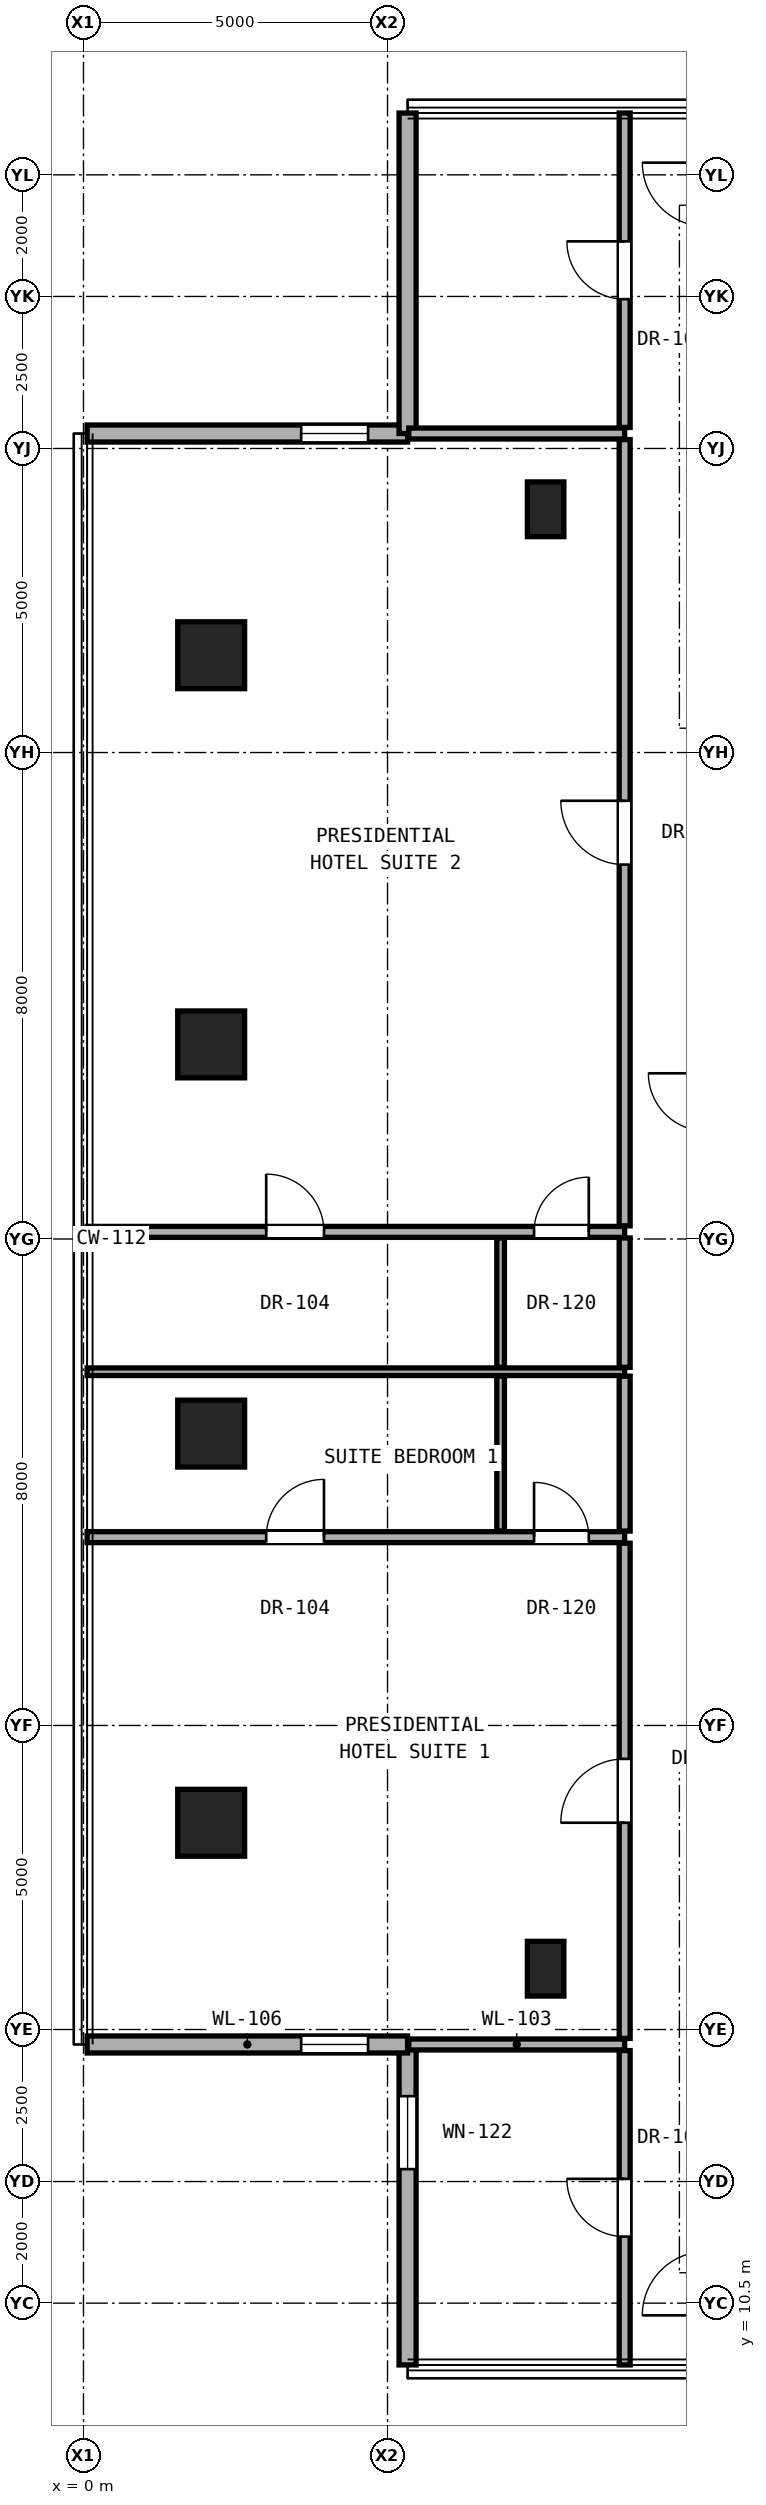
"""IFC4 building model, lengths in metres.
Left out: names, types, materials, properties, quantities, classifications, styles, units other than length and angle.
Written with IfcOpenShell. Run it as: python <this file> out.ifc"""

import sys

from ifc_helpers import new_model, si_unit, direction, frame, frame_2d, origin, origin_2d, place, context, subcontext, project, spatial, rectangle, hollow_rectangle, extrude, element, fill, save


model = new_model("IFC4")
c1 = context("Model", 3, precision=1e-05, world=origin(), true_north=direction((0.0, 1.0)))
c2 = subcontext(c1, "Body", "Model", "MODEL_VIEW")
j1 = project(units=[si_unit("LENGTHUNIT", "METRE"), si_unit("PLANEANGLEUNIT", "RADIAN")], contexts=[c1])
p1 = place(None, origin())
s1 = spatial("IfcSite", under=j1, at=p1, CompositionType="ELEMENT")
p2 = place(p1, origin())
s2 = spatial("IfcBuilding", under=s1, at=p2, CompositionType="ELEMENT")
p3 = place(p2, frame((0.0, 0.0, 124.7)))
s3 = spatial("IfcBuildingStorey", under=s2, at=p3, CompositionType="ELEMENT", Elevation=124.7)
for number, where, z_axis, x_axis in (
    (1, (2.1, 18.4, 0.0), (0.0, 0.0, 1.0), (1.0, 0.0, 0.0)),
    (2, (2.1, 24.8, 0.0), (0.0, 0.0, 1.0), (1.0, 0.0, 0.0)),
    (3, (2.1, 31.2, 0.0), (0.0, 0.0, 1.0), (1.0, 0.0, 0.0)),
    (4, (2.1, 37.6, 0.0), (0.0, 0.0, 1.0), (1.0, 0.0, 0.0)),
):
    element("IfcColumn", number, at=place(p3, frame(where, z_axis=z_axis, x_axis=x_axis)), inside=s3, PredefinedType="COLUMN", context=c2, shape_type="SweptSolid", body=[
        extrude(hollow_rectangle(XDim=1.1, YDim=1.1, WallThickness=0.06, at=origin_2d()), origin(), (0.0, 0.0, 1.0), 3.3),
    ])
for number, where, z_axis, x_axis in (
    (5, (7.6, 16.0, 0.0), (0.0, 0.0, 1.0), (1.0, 0.0, 0.0)),
    (6, (7.6, 40.0, 0.0), (0.0, 0.0, 1.0), (1.0, 0.0, 0.0)),
):
    element("IfcColumn", number, at=place(p3, frame(where, z_axis=z_axis, x_axis=x_axis)), inside=s3, PredefinedType="PILASTER", context=c2, shape_type="SweptSolid", body=[
        extrude(rectangle(XDim=0.6, YDim=0.9, at=origin_2d()), origin(), (0.0, 0.0, 1.0), 3.3),
    ])
p4 = place(p3, frame((5.33, 14.754, 0.0), z_axis=(0.0, 0.0, 1.0), x_axis=(0.0, -1.0, 0.0)))
e7 = element("IfcWall", 7, at=p4, inside=s3, PredefinedType="SOLIDWALL", context=c2, shape_type="SweptSolid", body=[
    extrude(rectangle(XDim=5.27, YDim=0.28, at=frame_2d((2.635, 0.0))), origin(), (0.0, 0.0, 1.0), 3.06),
])
p5 = place(p4, frame((0.85, 0.0, 0.81)))
e8 = element("IfcOpeningElement", 8, at=p5, cuts=e7, PredefinedType="OPENING", context=c2, shape_type="SweptSolid", body=[
    extrude(rectangle(XDim=1.2, YDim=2.1, at=frame_2d((0.6, 1.05))), frame((0.0, 0.15, 0.0), z_axis=(0.0, -1.0, 0.0), x_axis=(1.0, 0.0, 0.0)), (0.0, 0.0, 1.0), 0.3),
])
p6 = place(p3, frame((0.06, 14.754, 0.0), z_axis=(0.0, 0.0, 1.0), x_axis=(1.0, 0.0, 0.0)))
e9 = element("IfcWall", 9, at=p6, inside=s3, PredefinedType="SOLIDWALL", context=c2, shape_type="SweptSolid", body=[
    extrude(rectangle(XDim=5.27, YDim=0.28, at=frame_2d((2.635, 0.0))), origin(), (0.0, 0.0, 1.0), 3.06),
])
p7 = place(p6, frame((3.52, 0.0, 0.85)))
e10 = element("IfcOpeningElement", 10, at=p7, cuts=e9, PredefinedType="OPENING", context=c2, shape_type="SweptSolid", body=[
    extrude(rectangle(XDim=1.1, YDim=2.0, at=frame_2d((0.55, 1.0))), frame((0.0, 0.15, 0.0), z_axis=(0.0, -1.0, 0.0), x_axis=(1.0, 0.0, 0.0)), (0.0, 0.0, 1.0), 0.3),
])
p8 = place(p3, frame((5.33, 41.246, 0.0), z_axis=(0.0, 0.0, 1.0), x_axis=(-1.0, 0.0, 0.0)))
e11 = element("IfcWall", 11, at=p8, inside=s3, PredefinedType="SOLIDWALL", context=c2, shape_type="SweptSolid", body=[
    extrude(rectangle(XDim=5.27, YDim=0.28, at=frame_2d((2.635, 0.0))), origin(), (0.0, 0.0, 1.0), 3.06),
])
p9 = place(p8, frame((0.65, 0.0, 0.85)))
e12 = element("IfcOpeningElement", 12, at=p9, cuts=e11, PredefinedType="OPENING", context=c2, shape_type="SweptSolid", body=[
    extrude(rectangle(XDim=1.1, YDim=2.0, at=frame_2d((0.55, 1.0))), frame((0.0, 0.15, 0.0), z_axis=(0.0, -1.0, 0.0), x_axis=(1.0, 0.0, 0.0)), (0.0, 0.0, 1.0), 0.3),
])
p10 = place(p3, frame((5.33, 46.516, 0.0), z_axis=(0.0, 0.0, 1.0), x_axis=(0.0, -1.0, 0.0)))
e13 = element("IfcWall", 13, at=p10, inside=s3, PredefinedType="SOLIDWALL", context=c2, shape_type="SweptSolid", body=[
    extrude(rectangle(XDim=5.27, YDim=0.28, at=frame_2d((2.635, 0.0))), origin(), (0.0, 0.0, 1.0), 3.06),
])
p11 = place(p3, frame((5.35, 14.754, 0.0), z_axis=(0.0, 0.0, 1.0), x_axis=(1.0, 0.0, 0.0)))
e14 = element("IfcWall", 14, at=p11, inside=s3, PredefinedType="PARTITIONING", context=c2, shape_type="SweptSolid", body=[
    extrude(rectangle(XDim=3.55, YDim=0.18, at=frame_2d((1.775, 0.0))), origin(), (0.0, 0.0, 1.0), 3.08),
])
p12 = place(p3, frame((0.06, 23.097, 0.0), z_axis=(0.0, 0.0, 1.0), x_axis=(1.0, 0.0, 0.0)))
e15 = element("IfcWall", 15, at=p12, inside=s3, PredefinedType="PARTITIONING", context=c2, shape_type="SweptSolid", body=[
    extrude(rectangle(XDim=8.84, YDim=0.18, at=frame_2d((4.42, 0.0))), origin(), (0.0, 0.0, 1.0), 2.299),
])
p13 = place(p12, frame((2.945, 0.0, 0.0)))
e16 = element("IfcOpeningElement", 16, at=p13, cuts=e15, PredefinedType="OPENING", context=c2, shape_type="SweptSolid", body=[
    extrude(rectangle(XDim=0.95, YDim=2.15, at=frame_2d((0.475, 1.075))), frame((0.0, 0.1, 0.0), z_axis=(0.0, -1.0, 0.0), x_axis=(1.0, 0.0, 0.0)), (0.0, 0.0, 1.0), 0.2),
])
p14 = place(p12, frame((7.35, 0.0, 0.0)))
e17 = element("IfcOpeningElement", 17, at=p14, cuts=e15, PredefinedType="OPENING", context=c2, shape_type="SweptSolid", body=[
    extrude(rectangle(XDim=0.9, YDim=2.1, at=frame_2d((0.45, 1.05))), frame((0.0, 0.1, 0.0), z_axis=(0.0, -1.0, 0.0), x_axis=(1.0, 0.0, 0.0)), (0.0, 0.0, 1.0), 0.2),
])
p15 = place(p3, frame((0.06, 25.817, 0.0), z_axis=(0.0, 0.0, 1.0), x_axis=(1.0, 0.0, 0.0)))
e18 = element("IfcWall", 18, at=p15, inside=s3, PredefinedType="PARTITIONING", context=c2, shape_type="SweptSolid", body=[
    extrude(rectangle(XDim=8.84, YDim=0.125, at=frame_2d((4.42, 0.0))), origin(), (0.0, 0.0, 1.0), 2.299),
])
p16 = place(p3, frame((0.06, 28.117, 0.0), z_axis=(0.0, 0.0, 1.0), x_axis=(1.0, 0.0, 0.0)))
e19 = element("IfcWall", 19, at=p16, inside=s3, PredefinedType="PARTITIONING", context=c2, shape_type="SweptSolid", body=[
    extrude(rectangle(XDim=8.84, YDim=0.18, at=frame_2d((4.42, 0.0))), origin(), (0.0, 0.0, 1.0), 2.299),
])
p17 = place(p16, frame((2.945, 0.0, 0.0)))
e20 = element("IfcOpeningElement", 20, at=p17, cuts=e19, PredefinedType="OPENING", context=c2, shape_type="SweptSolid", body=[
    extrude(rectangle(XDim=0.95, YDim=2.15, at=frame_2d((0.475, 1.075))), frame((0.0, 0.1, 0.0), z_axis=(0.0, -1.0, 0.0), x_axis=(1.0, 0.0, 0.0)), (0.0, 0.0, 1.0), 0.2),
])
p18 = place(p16, frame((7.35, 0.0, 0.0)))
e21 = element("IfcOpeningElement", 21, at=p18, cuts=e19, PredefinedType="OPENING", context=c2, shape_type="SweptSolid", body=[
    extrude(rectangle(XDim=0.9, YDim=2.1, at=frame_2d((0.45, 1.05))), frame((0.0, 0.1, 0.0), z_axis=(0.0, -1.0, 0.0), x_axis=(1.0, 0.0, 0.0)), (0.0, 0.0, 1.0), 0.2),
])
p19 = place(p3, frame((5.35, 41.246, 0.0), z_axis=(0.0, 0.0, 1.0), x_axis=(1.0, 0.0, 0.0)))
e22 = element("IfcWall", 22, at=p19, inside=s3, PredefinedType="PARTITIONING", context=c2, shape_type="SweptSolid", body=[
    extrude(rectangle(XDim=3.55, YDim=0.18, at=frame_2d((1.775, 0.0))), origin(), (0.0, 0.0, 1.0), 3.08),
])
p20 = place(p3, frame((6.86, 23.197, 0.0), z_axis=(0.0, 0.0, 1.0), x_axis=(0.0, 1.0, 0.0)))
e23 = element("IfcWall", 23, at=p20, inside=s3, PredefinedType="PARTITIONING", context=c2, shape_type="SweptSolid", body=[
    extrude(rectangle(XDim=2.547, YDim=0.125, at=frame_2d((1.274, 0.0))), origin(), (0.0, 0.0, 1.0), 2.299),
])
p21 = place(p3, frame((6.86, 25.889, 0.0), z_axis=(0.0, 0.0, 1.0), x_axis=(0.0, 1.0, 0.0)))
e24 = element("IfcWall", 24, at=p21, inside=s3, PredefinedType="PARTITIONING", context=c2, shape_type="SweptSolid", body=[
    extrude(rectangle(XDim=2.128, YDim=0.125, at=frame_2d((1.064, 0.0))), origin(), (0.0, 0.0, 1.0), 3.08),
])
p22 = place(p3, frame((8.9, 9.484, 0.0), z_axis=(0.0, 0.0, 1.0), x_axis=(0.0, 1.0, 0.0)))
e25 = element("IfcWall", 25, at=p22, inside=s3, PredefinedType="PARTITIONING", context=c2, shape_type="SweptSolid", body=[
    extrude(rectangle(XDim=5.17, YDim=0.18, at=frame_2d((2.585, 0.0))), origin(), (0.0, 0.0, 1.0), 3.08),
])
p23 = place(p22, frame((2.11, 0.0, 0.0)))
e26 = element("IfcOpeningElement", 26, at=p23, cuts=e25, PredefinedType="OPENING", context=c2, shape_type="SweptSolid", body=[
    extrude(rectangle(XDim=0.95, YDim=2.15, at=frame_2d((0.475, 1.075))), frame((0.0, 0.1, 0.0), z_axis=(0.0, -1.0, 0.0), x_axis=(1.0, 0.0, 0.0)), (0.0, 0.0, 1.0), 0.2),
])
p24 = place(p3, frame((8.9, 14.854, 0.0), z_axis=(0.0, 0.0, 1.0), x_axis=(0.0, 1.0, 0.0)))
e27 = element("IfcWall", 27, at=p24, inside=s3, PredefinedType="PARTITIONING", context=c2, shape_type="SweptSolid", body=[
    extrude(rectangle(XDim=8.143, YDim=0.18, at=frame_2d((4.072, 0.0))), origin(), (0.0, 0.0, 1.0), 2.456),
])
p25 = place(p24, frame((3.546, 0.0, 0.0)))
e28 = element("IfcOpeningElement", 28, at=p25, cuts=e27, PredefinedType="OPENING", context=c2, shape_type="SweptSolid", body=[
    extrude(rectangle(XDim=1.05, YDim=2.2, at=frame_2d((0.525, 1.1))), frame((0.0, 0.1, 0.0), z_axis=(0.0, -1.0, 0.0), x_axis=(1.0, 0.0, 0.0)), (0.0, 0.0, 1.0), 0.2),
])
p26 = place(p3, frame((8.9, 23.197, 0.0), z_axis=(0.0, 0.0, 1.0), x_axis=(0.0, 1.0, 0.0)))
e29 = element("IfcWall", 29, at=p26, inside=s3, PredefinedType="PARTITIONING", context=c2, shape_type="SweptSolid", body=[
    extrude(rectangle(XDim=2.547, YDim=0.18, at=frame_2d((1.274, 0.0))), origin(), (0.0, 0.0, 1.0), 2.299),
])
p27 = place(p3, frame((8.9, 25.889, 0.0), z_axis=(0.0, 0.0, 1.0), x_axis=(0.0, 1.0, 0.0)))
e30 = element("IfcWall", 30, at=p27, inside=s3, PredefinedType="PARTITIONING", context=c2, shape_type="SweptSolid", body=[
    extrude(rectangle(XDim=2.128, YDim=0.18, at=frame_2d((1.064, 0.0))), origin(), (0.0, 0.0, 1.0), 3.08),
])
p28 = place(p3, frame((8.9, 28.217, 0.0), z_axis=(0.0, 0.0, 1.0), x_axis=(0.0, 1.0, 0.0)))
e31 = element("IfcWall", 31, at=p28, inside=s3, PredefinedType="PARTITIONING", context=c2, shape_type="SweptSolid", body=[
    extrude(rectangle(XDim=12.929, YDim=0.18, at=frame_2d((6.464, 0.0))), origin(), (0.0, 0.0, 1.0), 2.299),
])
p29 = place(p28, frame((5.939, 0.0, 0.0)))
e32 = element("IfcOpeningElement", 32, at=p29, cuts=e31, PredefinedType="OPENING", context=c2, shape_type="SweptSolid", body=[
    extrude(rectangle(XDim=1.05, YDim=2.2, at=frame_2d((0.525, 1.1))), frame((0.0, 0.1, 0.0), z_axis=(0.0, -1.0, 0.0), x_axis=(1.0, 0.0, 0.0)), (0.0, 0.0, 1.0), 0.2),
])
p30 = place(p3, frame((8.9, 41.346, 0.0), z_axis=(0.0, 0.0, 1.0), x_axis=(0.0, 1.0, 0.0)))
e33 = element("IfcWall", 33, at=p30, inside=s3, PredefinedType="PARTITIONING", context=c2, shape_type="SweptSolid", body=[
    extrude(rectangle(XDim=5.17, YDim=0.18, at=frame_2d((2.585, 0.0))), origin(), (0.0, 0.0, 1.0), 3.08),
])
p31 = place(p30, frame((2.11, 0.0, 0.0)))
e34 = element("IfcOpeningElement", 34, at=p31, cuts=e33, PredefinedType="OPENING", context=c2, shape_type="SweptSolid", body=[
    extrude(rectangle(XDim=0.95, YDim=2.15, at=frame_2d((0.475, 1.075))), frame((0.0, 0.1, 0.0), z_axis=(0.0, -1.0, 0.0), x_axis=(1.0, 0.0, 0.0)), (0.0, 0.0, 1.0), 0.2),
])
p32 = place(p5, origin())
e35 = element("IfcWindow", 35, at=p32, inside=s3, PartitioningType="SINGLE_PANEL", PredefinedType="WINDOW", context=c2, shape_type="SweptSolid", body=[
    extrude(rectangle(XDim=1.2, YDim=2.1, at=frame_2d((0.6, 1.05))), frame((0.0, 0.03, 0.0), z_axis=(0.0, -1.0, 0.0), x_axis=(1.0, 0.0, 0.0)), (0.0, 0.0, 1.0), 0.06),
])
fill(e8, e35)
p33 = place(p7, origin())
e36 = element("IfcWindow", 36, at=p33, inside=s3, PartitioningType="SINGLE_PANEL", PredefinedType="WINDOW", context=c2, shape_type="SweptSolid", body=[
    extrude(rectangle(XDim=1.1, YDim=2.0, at=frame_2d((0.55, 1.0))), frame((0.0, 0.03, 0.0), z_axis=(0.0, -1.0, 0.0), x_axis=(1.0, 0.0, 0.0)), (0.0, 0.0, 1.0), 0.06),
])
fill(e10, e36)
p34 = place(p9, origin())
e37 = element("IfcWindow", 37, at=p34, inside=s3, PartitioningType="SINGLE_PANEL", PredefinedType="WINDOW", context=c2, shape_type="SweptSolid", body=[
    extrude(rectangle(XDim=1.1, YDim=2.0, at=frame_2d((0.55, 1.0))), frame((0.0, 0.03, 0.0), z_axis=(0.0, -1.0, 0.0), x_axis=(1.0, 0.0, 0.0)), (0.0, 0.0, 1.0), 0.06),
])
fill(e12, e37)
p35 = place(p25, origin())
e38 = element("IfcDoor", 38, at=p35, inside=s3, OperationType="SINGLE_SWING_LEFT", PredefinedType="DOOR", context=c2, shape_type="SweptSolid", body=[
    extrude(rectangle(XDim=1.05, YDim=2.2, at=frame_2d((0.525, 1.1))), frame((0.0, 0.025, 0.0), z_axis=(0.0, -1.0, 0.0), x_axis=(1.0, 0.0, 0.0)), (0.0, 0.0, 1.0), 0.05),
])
fill(e28, e38)
p36 = place(p13, origin())
e39 = element("IfcDoor", 39, at=p36, inside=s3, OperationType="SINGLE_SWING_RIGHT", PredefinedType="DOOR", context=c2, shape_type="SweptSolid", body=[
    extrude(rectangle(XDim=0.95, YDim=2.15, at=frame_2d((0.475, 1.075))), frame((0.0, 0.025, 0.0), z_axis=(0.0, -1.0, 0.0), x_axis=(1.0, 0.0, 0.0)), (0.0, 0.0, 1.0), 0.05),
])
fill(e16, e39)
p37 = place(p14, origin())
e40 = element("IfcDoor", 40, at=p37, inside=s3, OperationType="SINGLE_SWING_LEFT", PredefinedType="DOOR", context=c2, shape_type="SweptSolid", body=[
    extrude(rectangle(XDim=0.9, YDim=2.1, at=frame_2d((0.45, 1.05))), frame((0.0, 0.025, 0.0), z_axis=(0.0, -1.0, 0.0), x_axis=(1.0, 0.0, 0.0)), (0.0, 0.0, 1.0), 0.05),
])
fill(e17, e40)
p38 = place(p29, origin())
e41 = element("IfcDoor", 41, at=p38, inside=s3, OperationType="SINGLE_SWING_RIGHT", PredefinedType="DOOR", context=c2, shape_type="SweptSolid", body=[
    extrude(rectangle(XDim=1.05, YDim=2.2, at=frame_2d((0.525, 1.1))), frame((0.0, 0.025, 0.0), z_axis=(0.0, -1.0, 0.0), x_axis=(1.0, 0.0, 0.0)), (0.0, 0.0, 1.0), 0.05),
])
fill(e32, e41)
p39 = place(p17, origin())
e42 = element("IfcDoor", 42, at=p39, inside=s3, OperationType="SINGLE_SWING_LEFT", PredefinedType="DOOR", context=c2, shape_type="SweptSolid", body=[
    extrude(rectangle(XDim=0.95, YDim=2.15, at=frame_2d((0.475, 1.075))), frame((0.0, 0.025, 0.0), z_axis=(0.0, -1.0, 0.0), x_axis=(1.0, 0.0, 0.0)), (0.0, 0.0, 1.0), 0.05),
])
fill(e20, e42)
p40 = place(p18, origin())
e43 = element("IfcDoor", 43, at=p40, inside=s3, OperationType="SINGLE_SWING_RIGHT", PredefinedType="DOOR", context=c2, shape_type="SweptSolid", body=[
    extrude(rectangle(XDim=0.9, YDim=2.1, at=frame_2d((0.45, 1.05))), frame((0.0, 0.025, 0.0), z_axis=(0.0, -1.0, 0.0), x_axis=(1.0, 0.0, 0.0)), (0.0, 0.0, 1.0), 0.05),
])
fill(e21, e43)
p41 = place(p23, origin())
e44 = element("IfcDoor", 44, at=p41, inside=s3, OperationType="SINGLE_SWING_RIGHT", PredefinedType="DOOR", context=c2, shape_type="SweptSolid", body=[
    extrude(rectangle(XDim=0.95, YDim=2.15, at=frame_2d((0.475, 1.075))), frame((0.0, 0.025, 0.0), z_axis=(0.0, -1.0, 0.0), x_axis=(1.0, 0.0, 0.0)), (0.0, 0.0, 1.0), 0.05),
])
fill(e26, e44)
p42 = place(p31, origin())
e45 = element("IfcDoor", 45, at=p42, inside=s3, OperationType="SINGLE_SWING_RIGHT", PredefinedType="DOOR", context=c2, shape_type="SweptSolid", body=[
    extrude(rectangle(XDim=0.95, YDim=2.15, at=frame_2d((0.475, 1.075))), frame((0.0, 0.025, 0.0), z_axis=(0.0, -1.0, 0.0), x_axis=(1.0, 0.0, 0.0)), (0.0, 0.0, 1.0), 0.05),
])
fill(e34, e45)
save(model, sys.argv[1])
